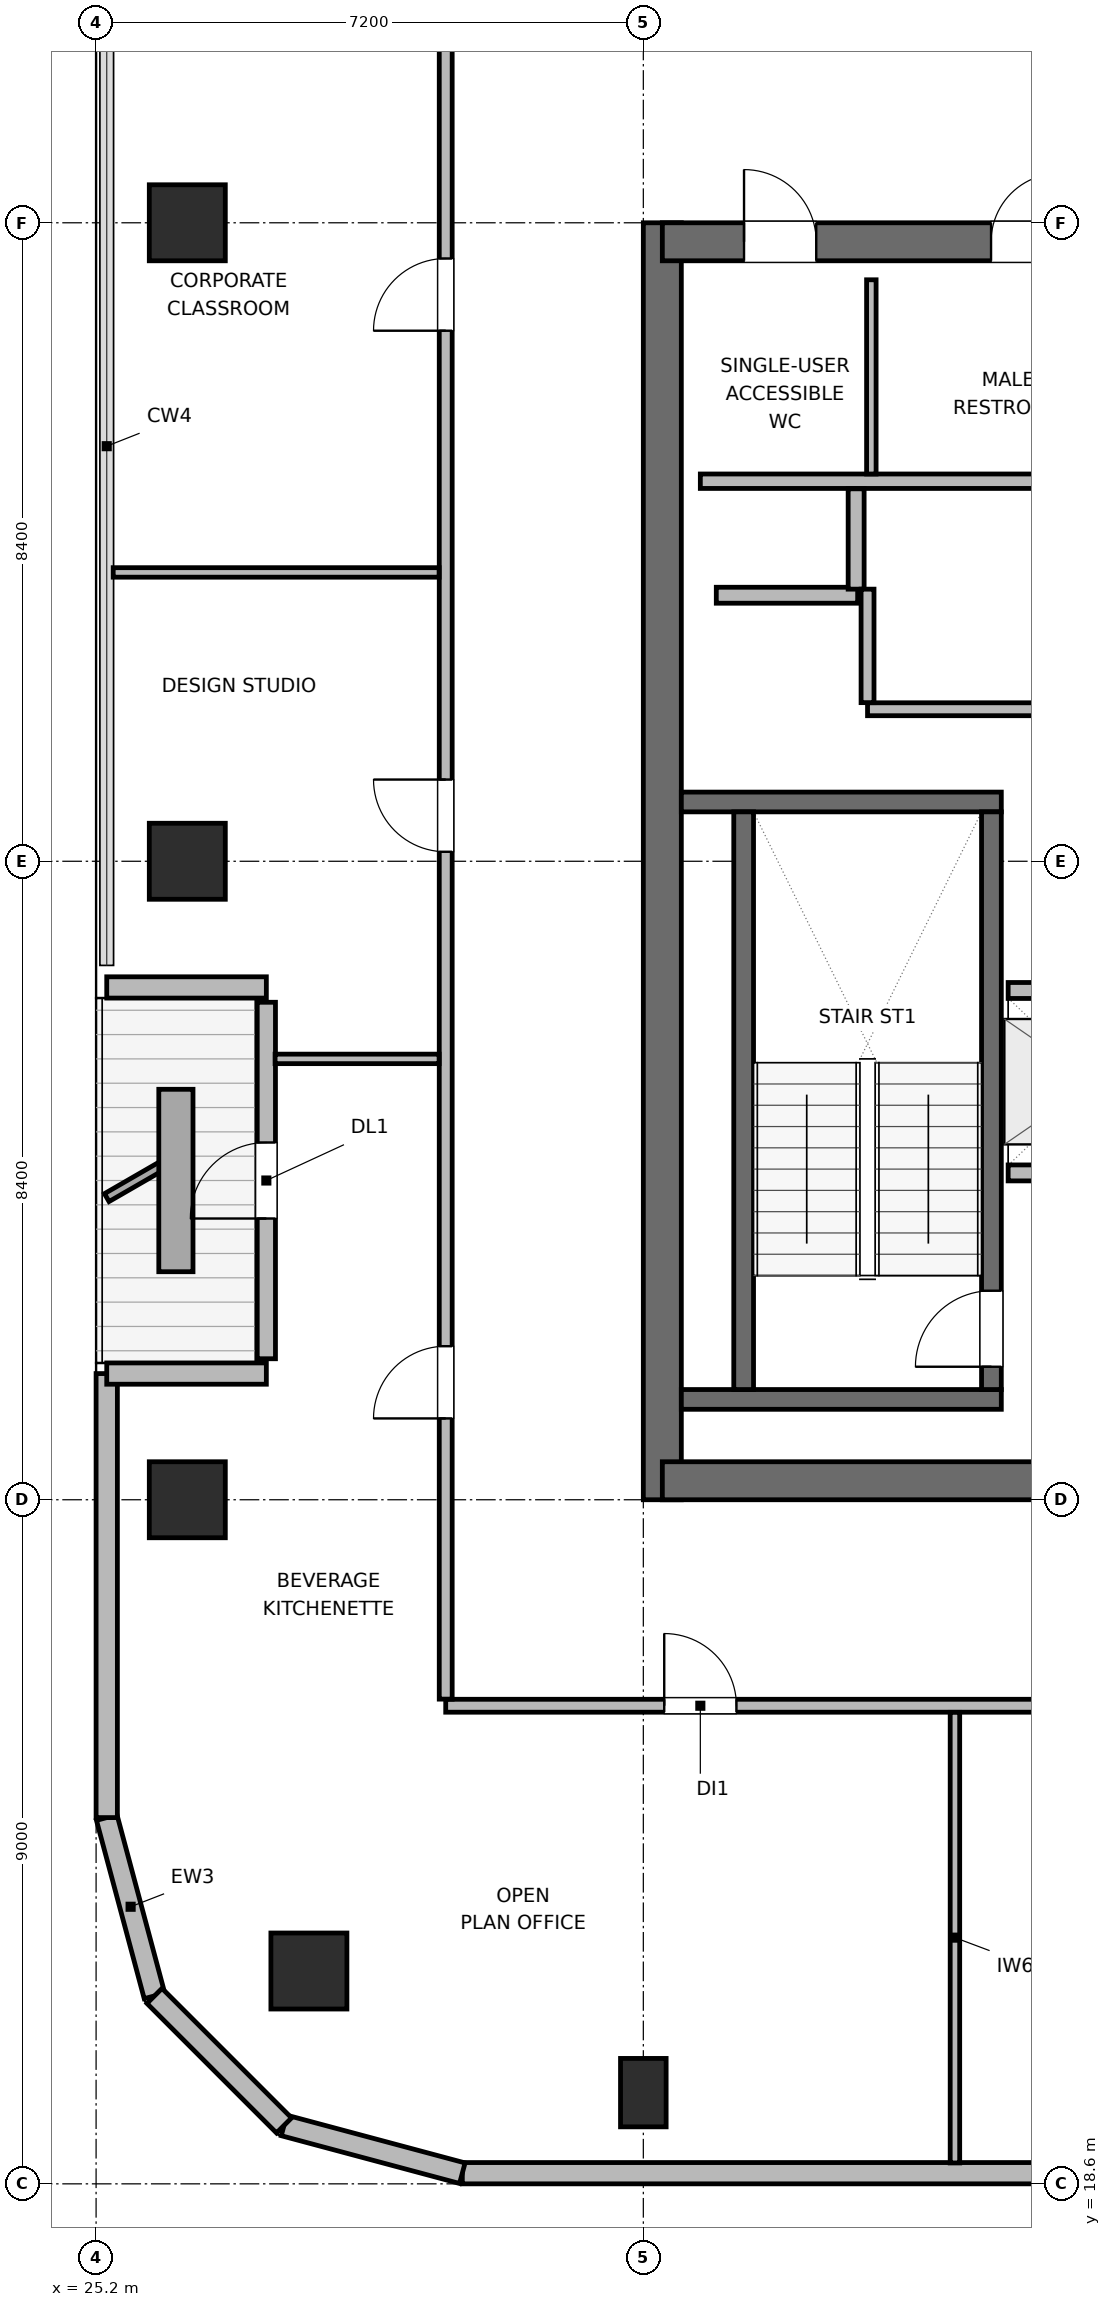
"""IFC4 building model, lengths in metres.
Left out: names, types, materials, properties, quantities, classifications, styles, units other than length and angle.
Written with IfcOpenShell. Run it as: python <this file> out.ifc"""

import sys

from ifc_helpers import new_model, si_unit, direction, frame, frame_2d, origin, origin_2d, place, context, subcontext, project, spatial, rectangle, circle, extrude, element, fill, save


model = new_model("IFC4")
c1 = context("Model", 3, precision=1e-05, world=origin(), true_north=direction((0.0, 1.0)))
c2 = subcontext(c1, "Body", "Model", "MODEL_VIEW")
j1 = project(units=[si_unit("LENGTHUNIT", "METRE"), si_unit("PLANEANGLEUNIT", "RADIAN")], contexts=[c1])
p1 = place(None, origin())
s1 = spatial("IfcSite", under=j1, at=p1, CompositionType="ELEMENT")
p2 = place(p1, origin())
s2 = spatial("IfcBuilding", under=s1, at=p2, CompositionType="ELEMENT")
p3 = place(p2, frame((0.0, 0.0, 262.8)))
s3 = spatial("IfcBuildingStorey", under=s2, at=p3, CompositionType="ELEMENT", Elevation=262.8)
p4 = place(p3, frame((32.65, 27.6, 0.0), z_axis=(0.0, 0.0, 1.0), x_axis=(0.0, 1.0, 0.0)))
e1 = element("IfcWall", 1, at=p4, inside=s3, PredefinedType="SHEAR", context=c2, shape_type="SweptSolid", body=[
    extrude(rectangle(XDim=16.8, YDim=0.5, at=frame_2d((8.4, 0.0))), origin(), (0.0, 0.0, 1.0), 3.9),
])
p5 = place(p3, frame((32.65, 27.85, 0.0), z_axis=(0.0, 0.0, 1.0), x_axis=(1.0, 0.0, 0.0)))
e2 = element("IfcWall", 2, at=p5, inside=s3, PredefinedType="SHEAR", context=c2, shape_type="SweptSolid", body=[
    extrude(rectangle(XDim=9.5, YDim=0.5, at=frame_2d((4.75, 0.0))), origin(), (0.0, 0.0, 1.0), 3.9),
])
p6 = place(p5, frame((5.075, 0.0, 0.0)))
e3 = element("IfcOpeningElement", 3, at=p6, cuts=e2, PredefinedType="OPENING", context=c2, shape_type="SweptSolid", body=[
    extrude(rectangle(XDim=1.05, YDim=2.04, at=frame_2d((0.525, 1.02))), frame((0.0, 0.26, 0.0), z_axis=(0.0, -1.0, 0.0), x_axis=(1.0, 0.0, 0.0)), (0.0, 0.0, 1.0), 0.52),
])
p7 = place(p3, frame((32.65, 44.15, 0.0), z_axis=(0.0, 0.0, 1.0), x_axis=(1.0, 0.0, 0.0)))
e4 = element("IfcWall", 4, at=p7, inside=s3, PredefinedType="SHEAR", context=c2, shape_type="SweptSolid", body=[
    extrude(rectangle(XDim=9.5, YDim=0.5, at=frame_2d((4.75, 0.0))), origin(), (0.0, 0.0, 1.0), 3.9),
])
p8 = place(p7, frame((1.075, 0.0, 0.0)))
e5 = element("IfcOpeningElement", 5, at=p8, cuts=e4, PredefinedType="OPENING", context=c2, shape_type="SweptSolid", body=[
    extrude(rectangle(XDim=0.95, YDim=2.04, at=frame_2d((0.475, 1.02))), frame((0.0, 0.26, 0.0), z_axis=(0.0, -1.0, 0.0), x_axis=(1.0, 0.0, 0.0)), (0.0, 0.0, 1.0), 0.52),
])
p9 = place(p7, frame((4.325, 0.0, 0.0)))
e6 = element("IfcOpeningElement", 6, at=p9, cuts=e4, PredefinedType="OPENING", context=c2, shape_type="SweptSolid", body=[
    extrude(rectangle(XDim=0.9, YDim=2.02, at=frame_2d((0.45, 1.01))), frame((0.0, 0.26, 0.0), z_axis=(0.0, -1.0, 0.0), x_axis=(1.0, 0.0, 0.0)), (0.0, 0.0, 1.0), 0.52),
])
p10 = place(p7, frame((7.225, 0.0, 0.0)))
e7 = element("IfcOpeningElement", 7, at=p10, cuts=e4, PredefinedType="OPENING", context=c2, shape_type="SweptSolid", body=[
    extrude(rectangle(XDim=0.9, YDim=2.02, at=frame_2d((0.45, 1.01))), frame((0.0, 0.26, 0.0), z_axis=(0.0, -1.0, 0.0), x_axis=(1.0, 0.0, 0.0)), (0.0, 0.0, 1.0), 0.52),
])
for number, where, z_axis, x_axis in (
    (8, (32.9, 28.92, 0.0), (0.0, 0.0, 1.0), (1.0, 0.0, 0.0)),
    (9, (32.9, 36.78, 0.0), (0.0, 0.0, 1.0), (1.0, 0.0, 0.0)),
):
    element("IfcWall", number, at=place(p3, frame(where, z_axis=z_axis, x_axis=x_axis)), inside=s3, PredefinedType="SHEAR", context=c2, shape_type="SweptSolid", body=[
        extrude(rectangle(XDim=4.21, YDim=0.26, at=frame_2d((2.105, 0.0))), origin(), (0.0, 0.0, 1.0), 3.9),
    ])
p11 = place(p3, frame((33.72, 29.05, 0.0), z_axis=(0.0, 0.0, 1.0), x_axis=(0.0, 1.0, 0.0)))
e10 = element("IfcWall", 10, at=p11, inside=s3, PredefinedType="SHEAR", context=c2, shape_type="SweptSolid", body=[
    extrude(rectangle(XDim=7.6, YDim=0.26, at=frame_2d((3.8, 0.0))), origin(), (0.0, 0.0, 1.0), 3.9),
])
p12 = place(p3, frame((36.98, 29.05, 0.0), z_axis=(0.0, 0.0, 1.0), x_axis=(0.0, 1.0, 0.0)))
e11 = element("IfcWall", 11, at=p12, inside=s3, PredefinedType="SHEAR", context=c2, shape_type="SweptSolid", body=[
    extrude(rectangle(XDim=7.6, YDim=0.26, at=frame_2d((3.8, 0.0))), origin(), (0.0, 0.0, 1.0), 3.9),
])
p13 = place(p12, frame((0.3, 0.0, 0.0)))
e12 = element("IfcOpeningElement", 12, at=p13, cuts=e11, PredefinedType="OPENING", context=c2, shape_type="SweptSolid", body=[
    extrude(rectangle(XDim=1.0, YDim=2.04, at=frame_2d((0.5, 1.02))), frame((0.0, 0.14, 0.0), z_axis=(0.0, -1.0, 0.0), x_axis=(1.0, 0.0, 0.0)), (0.0, 0.0, 1.0), 0.28),
])
p14 = place(p3, frame((28.0, 21.4, 0.0), z_axis=(0.0, 0.0, 1.0), x_axis=(1.0, 0.0, 0.0)))
e13 = element("IfcColumn", 13, at=p14, inside=s3, PredefinedType="COLUMN", context=c2, shape_type="SweptSolid", body=[
    extrude(circle(Radius=0.5, at=origin_2d()), origin(), (0.0, 0.0, 1.0), 3.9),
])
p15 = place(p3, frame((32.4, 19.8, 0.0), z_axis=(0.0, 0.0, 1.0), x_axis=(1.0, 0.0, 0.0)))
e14 = element("IfcColumn", 14, at=p15, inside=s3, PredefinedType="COLUMN", context=c2, shape_type="SweptSolid", body=[
    extrude(rectangle(XDim=0.6, YDim=0.9, at=origin_2d()), origin(), (0.0, 0.0, 1.0), 3.9),
])
for number, where, z_axis, x_axis in (
    (15, (26.4, 27.6, 0.0), (0.0, 0.0, 1.0), (1.0, 0.0, 0.0)),
    (16, (26.4, 36.0, 0.0), (0.0, 0.0, 1.0), (1.0, 0.0, 0.0)),
    (17, (26.4, 44.4, 0.0), (0.0, 0.0, 1.0), (1.0, 0.0, 0.0)),
):
    element("IfcColumn", number, at=place(p3, frame(where, z_axis=z_axis, x_axis=x_axis)), inside=s3, PredefinedType="COLUMN", context=c2, shape_type="SweptSolid", body=[
        extrude(rectangle(XDim=1.0, YDim=1.0, at=origin_2d()), origin(), (0.0, 0.0, 1.0), 3.9),
    ])
p16 = place(p3, frame((25.969, 21.073, 0.0), z_axis=(0.0, 0.0, 1.0), x_axis=(-0.258751159445, 0.965944013639, 0.0)))
e18 = element("IfcWall", 18, at=p16, inside=s3, PredefinedType="SOLIDWALL", context=c2, shape_type="SweptSolid", body=[
    extrude(rectangle(XDim=2.429, YDim=0.28, at=frame_2d((1.214, 0.0))), origin(), (0.0, 0.0, 1.0), 3.68),
])
p17 = place(p3, frame((25.34, 23.418, 0.0), z_axis=(0.0, 0.0, 1.0), x_axis=(0.0, 1.0, 0.0)))
e19 = element("IfcWall", 19, at=p17, inside=s3, PredefinedType="SOLIDWALL", context=c2, shape_type="SweptSolid", body=[
    extrude(rectangle(XDim=5.842, YDim=0.28, at=frame_2d((2.921, 0.0))), origin(), (0.0, 0.0, 1.0), 3.68),
])
p18 = place(p3, frame((25.34, 29.26, 0.0), z_axis=(0.0, 0.0, 1.0), x_axis=(1.0, 0.0, 0.0)))
e20 = element("IfcWall", 20, at=p18, inside=s3, PredefinedType="SOLIDWALL", context=c2, shape_type="SweptSolid", body=[
    extrude(rectangle(XDim=2.1, YDim=0.28, at=frame_2d((1.05, 0.0))), origin(), (0.0, 0.0, 1.0), 3.126),
])
p19 = place(p3, frame((27.44, 29.455, 0.0), z_axis=(0.0, 0.0, 1.0), x_axis=(0.0, 1.0, 0.0)))
e21 = element("IfcWall", 21, at=p19, inside=s3, PredefinedType="SOLIDWALL", context=c2, shape_type="SweptSolid", body=[
    extrude(rectangle(XDim=4.69, YDim=0.24, at=frame_2d((2.345, 0.0))), origin(), (0.0, 0.0, 1.0), 3.311),
])
p20 = place(p19, frame((1.845, 0.0, 0.0)))
e22 = element("IfcOpeningElement", 22, at=p20, cuts=e21, PredefinedType="OPENING", context=c2, shape_type="SweptSolid", body=[
    extrude(rectangle(XDim=1.0, YDim=2.02, at=frame_2d((0.5, 1.01))), frame((0.0, 0.13, 0.0), z_axis=(0.0, -1.0, 0.0), x_axis=(1.0, 0.0, 0.0)), (0.0, 0.0, 1.0), 0.26),
])
p21 = place(p3, frame((27.44, 34.34, 0.0), z_axis=(0.0, 0.0, 1.0), x_axis=(-1.0, 0.0, 0.0)))
e23 = element("IfcWall", 23, at=p21, inside=s3, PredefinedType="SOLIDWALL", context=c2, shape_type="SweptSolid", body=[
    extrude(rectangle(XDim=2.1, YDim=0.28, at=frame_2d((1.05, 0.0))), origin(), (0.0, 0.0, 1.0), 3.126),
])
p22 = place(p3, frame((41.369, 18.74, 0.0), z_axis=(0.0, 0.0, 1.0), x_axis=(-1.0, 0.0, 0.0)))
e24 = element("IfcWall", 24, at=p22, inside=s3, PredefinedType="SOLIDWALL", context=c2, shape_type="SweptSolid", body=[
    extrude(rectangle(XDim=11.351, YDim=0.28, at=frame_2d((5.675, 0.0))), origin(), (0.0, 0.0, 1.0), 3.68),
])
p23 = place(p3, frame((30.018, 18.74, 0.0), z_axis=(0.0, 0.0, 1.0), x_axis=(-0.965937282298, 0.25877628691, 0.0)))
e25 = element("IfcWall", 25, at=p23, inside=s3, PredefinedType="SOLIDWALL", context=c2, shape_type="SweptSolid", body=[
    extrude(rectangle(XDim=2.428, YDim=0.28, at=frame_2d((1.214, 0.0))), origin(), (0.0, 0.0, 1.0), 3.68),
])
p24 = place(p3, frame((27.673, 19.368, 0.0), z_axis=(0.0, 0.0, 1.0), x_axis=(-0.707106781187, 0.707106781187, 0.0)))
e26 = element("IfcWall", 26, at=p24, inside=s3, PredefinedType="SOLIDWALL", context=c2, shape_type="SweptSolid", body=[
    extrude(rectangle(XDim=2.41, YDim=0.28, at=frame_2d((1.205, 0.0))), origin(), (0.0, 0.0, 1.0), 3.68),
])
p25 = place(p3, frame((33.15, 41.0, 0.0), z_axis=(0.0, 0.0, 1.0), x_axis=(1.0, 0.0, 0.0)))
e27 = element("IfcWall", 27, at=p25, inside=s3, PredefinedType="PLUMBINGWALL", context=c2, shape_type="SweptSolid", body=[
    extrude(rectangle(XDim=8.5, YDim=0.19, at=frame_2d((4.25, 0.0))), origin(), (0.0, 0.0, 1.0), 3.68),
])
p26 = place(p3, frame((35.4, 41.095, 0.0), z_axis=(0.0, 0.0, 1.0), x_axis=(0.0, 1.0, 0.0)))
e28 = element("IfcWall", 28, at=p26, inside=s3, PredefinedType="PARTITIONING", context=c2, shape_type="SweptSolid", body=[
    extrude(rectangle(XDim=2.555, YDim=0.125, at=frame_2d((1.277, 0.0))), origin(), (0.0, 0.0, 1.0), 3.68),
])
p27 = place(p3, frame((33.36, 39.5, 0.0), z_axis=(0.0, 0.0, 1.0), x_axis=(1.0, 0.0, 0.0)))
e29 = element("IfcWall", 29, at=p27, inside=s3, PredefinedType="PARTITIONING", context=c2, shape_type="SweptSolid", body=[
    extrude(rectangle(XDim=1.86, YDim=0.21, at=frame_2d((0.93, 0.0))), origin(), (0.0, 0.0, 1.0), 3.68),
])
p28 = place(p3, frame((35.2, 39.58, 0.0), z_axis=(0.0, 0.0, 1.0), x_axis=(0.0, 1.0, 0.0)))
e30 = element("IfcWall", 30, at=p28, inside=s3, PredefinedType="PARTITIONING", context=c2, shape_type="SweptSolid", body=[
    extrude(rectangle(XDim=1.32, YDim=0.21, at=frame_2d((0.66, 0.0))), origin(), (0.0, 0.0, 1.0), 3.68),
])
p29 = place(p3, frame((37.2, 31.9, 0.0), z_axis=(0.0, 0.0, 1.0), x_axis=(1.0, 0.0, 0.0)))
e31 = element("IfcWall", 31, at=p29, inside=s3, PredefinedType="PARTITIONING", context=c2, shape_type="SweptSolid", body=[
    extrude(rectangle(XDim=2.3, YDim=0.21, at=frame_2d((1.15, 0.0))), origin(), (0.0, 0.0, 1.0), 3.68),
])
p30 = place(p29, frame((0.55, 0.0, 0.0)))
e32 = element("IfcOpeningElement", 32, at=p30, cuts=e31, PredefinedType="OPENING", context=c2, shape_type="SweptSolid", body=[
    extrude(rectangle(XDim=1.2, YDim=2.04, at=frame_2d((0.6, 1.02))), frame((0.0, 0.115, 0.0), z_axis=(0.0, -1.0, 0.0), x_axis=(1.0, 0.0, 0.0)), (0.0, 0.0, 1.0), 0.23),
])
p31 = place(p3, frame((37.2, 34.3, 0.0), z_axis=(0.0, 0.0, 1.0), x_axis=(1.0, 0.0, 0.0)))
e33 = element("IfcWall", 33, at=p31, inside=s3, PredefinedType="PARTITIONING", context=c2, shape_type="SweptSolid", body=[
    extrude(rectangle(XDim=2.3, YDim=0.21, at=frame_2d((1.15, 0.0))), origin(), (0.0, 0.0, 1.0), 3.68),
])
p32 = place(p3, frame((35.35, 38.0, 0.0), z_axis=(0.0, 0.0, 1.0), x_axis=(1.0, 0.0, 0.0)))
e34 = element("IfcWall", 34, at=p32, inside=s3, PredefinedType="PARTITIONING", context=c2, shape_type="SweptSolid", body=[
    extrude(rectangle(XDim=6.1, YDim=0.17, at=frame_2d((3.05, 0.0))), origin(), (0.0, 0.0, 1.0), 3.68),
])
p33 = place(p32, frame((2.6, 0.0, 0.0)))
e35 = element("IfcOpeningElement", 35, at=p33, cuts=e34, PredefinedType="OPENING", context=c2, shape_type="SweptSolid", body=[
    extrude(rectangle(XDim=0.9, YDim=2.02, at=frame_2d((0.45, 1.01))), frame((0.0, 0.095, 0.0), z_axis=(0.0, -1.0, 0.0), x_axis=(1.0, 0.0, 0.0)), (0.0, 0.0, 1.0), 0.19),
])
p34 = place(p3, frame((35.35, 38.087, 0.0), z_axis=(0.0, 0.0, 1.0), x_axis=(0.0, 1.0, 0.0)))
e36 = element("IfcWall", 36, at=p34, inside=s3, PredefinedType="PARTITIONING", context=c2, shape_type="SweptSolid", body=[
    extrude(rectangle(XDim=1.493, YDim=0.17, at=frame_2d((0.747, 0.0))), origin(), (0.0, 0.0, 1.0), 3.68),
])
p35 = place(p3, frame((29.8, 24.89, 0.0), z_axis=(0.0, 0.0, 1.0), x_axis=(1.0, 0.0, 0.0)))
e37 = element("IfcWall", 37, at=p35, inside=s3, PredefinedType="PARTITIONING", context=c2, shape_type="SweptSolid", body=[
    extrude(rectangle(XDim=33.8, YDim=0.17, at=frame_2d((16.9, 0.0))), origin(), (0.0, 0.0, 1.0), 3.68),
])
p36 = place(p35, frame((2.875, 0.0, 0.0)))
e38 = element("IfcOpeningElement", 38, at=p36, cuts=e37, PredefinedType="OPENING", context=c2, shape_type="SweptSolid", body=[
    extrude(rectangle(XDim=0.95, YDim=2.04, at=frame_2d((0.475, 1.02))), frame((0.0, 0.095, 0.0), z_axis=(0.0, -1.0, 0.0), x_axis=(1.0, 0.0, 0.0)), (0.0, 0.0, 1.0), 0.19),
])
p37 = place(p35, frame((14.225, 0.0, 0.0)))
e39 = element("IfcOpeningElement", 39, at=p37, cuts=e37, PredefinedType="OPENING", context=c2, shape_type="SweptSolid", body=[
    extrude(rectangle(XDim=0.95, YDim=2.04, at=frame_2d((0.475, 1.02))), frame((0.0, 0.095, 0.0), z_axis=(0.0, -1.0, 0.0), x_axis=(1.0, 0.0, 0.0)), (0.0, 0.0, 1.0), 0.19),
])
p38 = place(p35, frame((27.775, 0.0, 0.0)))
e40 = element("IfcOpeningElement", 40, at=p38, cuts=e37, PredefinedType="OPENING", context=c2, shape_type="SweptSolid", body=[
    extrude(rectangle(XDim=0.95, YDim=2.04, at=frame_2d((0.475, 1.02))), frame((0.0, 0.095, 0.0), z_axis=(0.0, -1.0, 0.0), x_axis=(1.0, 0.0, 0.0)), (0.0, 0.0, 1.0), 0.19),
])
p39 = place(p3, frame((29.8, 24.977, 0.0), z_axis=(0.0, 0.0, 1.0), x_axis=(0.0, 1.0, 0.0)))
e41 = element("IfcWall", 41, at=p39, inside=s3, PredefinedType="PARTITIONING", context=c2, shape_type="SweptSolid", body=[
    extrude(rectangle(XDim=22.046, YDim=0.17, at=frame_2d((11.023, 0.0))), origin(), (0.0, 0.0, 1.0), 3.68),
])
p40 = place(p39, frame((3.693, 0.0, 0.0)))
e42 = element("IfcOpeningElement", 42, at=p40, cuts=e41, PredefinedType="OPENING", context=c2, shape_type="SweptSolid", body=[
    extrude(rectangle(XDim=0.95, YDim=2.04, at=frame_2d((0.475, 1.02))), frame((0.0, 0.095, 0.0), z_axis=(0.0, -1.0, 0.0), x_axis=(1.0, 0.0, 0.0)), (0.0, 0.0, 1.0), 0.19),
])
p41 = place(p39, frame((11.148, 0.0, 0.0)))
e43 = element("IfcOpeningElement", 43, at=p41, cuts=e41, PredefinedType="OPENING", context=c2, shape_type="SweptSolid", body=[
    extrude(rectangle(XDim=0.95, YDim=2.04, at=frame_2d((0.475, 1.02))), frame((0.0, 0.095, 0.0), z_axis=(0.0, -1.0, 0.0), x_axis=(1.0, 0.0, 0.0)), (0.0, 0.0, 1.0), 0.19),
])
p42 = place(p39, frame((18.003, 0.0, 0.0)))
e44 = element("IfcOpeningElement", 44, at=p42, cuts=e41, PredefinedType="OPENING", context=c2, shape_type="SweptSolid", body=[
    extrude(rectangle(XDim=0.95, YDim=2.04, at=frame_2d((0.475, 1.02))), frame((0.0, 0.095, 0.0), z_axis=(0.0, -1.0, 0.0), x_axis=(1.0, 0.0, 0.0)), (0.0, 0.0, 1.0), 0.19),
])
p43 = place(p3, frame((36.5, 18.875, 0.0), z_axis=(0.0, 0.0, 1.0), x_axis=(0.0, 1.0, 0.0)))
e45 = element("IfcWall", 45, at=p43, inside=s3, PredefinedType="PARTITIONING", context=c2, shape_type="SweptSolid", body=[
    extrude(rectangle(XDim=5.928, YDim=0.125, at=frame_2d((2.964, 0.0))), origin(), (0.0, 0.0, 1.0), 3.68),
])
p44 = place(p3, frame((27.555, 33.4, 0.0), z_axis=(0.0, 0.0, 1.0), x_axis=(1.0, 0.0, 0.0)))
e46 = element("IfcWall", 46, at=p44, inside=s3, PredefinedType="PARTITIONING", context=c2, shape_type="SweptSolid", body=[
    extrude(rectangle(XDim=2.158, YDim=0.125, at=frame_2d((1.079, 0.0))), origin(), (0.0, 0.0, 1.0), 3.68),
])
p45 = place(p3, frame((25.425, 39.8, 0.0), z_axis=(0.0, 0.0, 1.0), x_axis=(1.0, 0.0, 0.0)))
e47 = element("IfcWall", 47, at=p45, inside=s3, PredefinedType="PARTITIONING", context=c2, shape_type="SweptSolid", body=[
    extrude(rectangle(XDim=4.288, YDim=0.125, at=frame_2d((2.144, 0.0))), origin(), (0.0, 0.0, 1.0), 3.68),
])
p46 = place(p20, origin())
e48 = element("IfcDoor", 48, at=p46, inside=s3, OperationType="SINGLE_SWING_LEFT", PredefinedType="DOOR", context=c2, shape_type="SweptSolid", body=[
    extrude(rectangle(XDim=1.0, YDim=2.02, at=frame_2d((0.5, 1.01))), frame((0.0, 0.025, 0.0), z_axis=(0.0, -1.0, 0.0), x_axis=(1.0, 0.0, 0.0)), (0.0, 0.0, 1.0), 0.05),
])
fill(e22, e48)
p47 = place(p13, origin())
e49 = element("IfcDoor", 49, at=p47, inside=s3, OperationType="SINGLE_SWING_LEFT", PredefinedType="DOOR", context=c2, shape_type="SweptSolid", body=[
    extrude(rectangle(XDim=1.0, YDim=2.04, at=frame_2d((0.5, 1.02))), frame((0.0, 0.025, 0.0), z_axis=(0.0, -1.0, 0.0), x_axis=(1.0, 0.0, 0.0)), (0.0, 0.0, 1.0), 0.05),
])
fill(e12, e49)
p48 = place(p8, origin())
e50 = element("IfcDoor", 50, at=p48, inside=s3, OperationType="SINGLE_SWING_LEFT", PredefinedType="DOOR", context=c2, shape_type="SweptSolid", body=[
    extrude(rectangle(XDim=0.95, YDim=2.04, at=frame_2d((0.475, 1.02))), frame((0.0, 0.025, 0.0), z_axis=(0.0, -1.0, 0.0), x_axis=(1.0, 0.0, 0.0)), (0.0, 0.0, 1.0), 0.05),
])
fill(e5, e50)
p49 = place(p9, origin())
e51 = element("IfcDoor", 51, at=p49, inside=s3, OperationType="SINGLE_SWING_RIGHT", PredefinedType="DOOR", context=c2, shape_type="SweptSolid", body=[
    extrude(rectangle(XDim=0.9, YDim=2.02, at=frame_2d((0.45, 1.01))), frame((0.0, 0.025, 0.0), z_axis=(0.0, -1.0, 0.0), x_axis=(1.0, 0.0, 0.0)), (0.0, 0.0, 1.0), 0.05),
])
fill(e6, e51)
p50 = place(p36, origin())
e52 = element("IfcDoor", 52, at=p50, inside=s3, OperationType="SINGLE_SWING_LEFT", PredefinedType="DOOR", context=c2, shape_type="SweptSolid", body=[
    extrude(rectangle(XDim=0.95, YDim=2.04, at=frame_2d((0.475, 1.02))), frame((0.0, 0.025, 0.0), z_axis=(0.0, -1.0, 0.0), x_axis=(1.0, 0.0, 0.0)), (0.0, 0.0, 1.0), 0.05),
])
fill(e38, e52)
p51 = place(p40, origin())
e53 = element("IfcDoor", 53, at=p51, inside=s3, OperationType="SINGLE_SWING_LEFT", PredefinedType="DOOR", context=c2, shape_type="SweptSolid", body=[
    extrude(rectangle(XDim=0.95, YDim=2.04, at=frame_2d((0.475, 1.02))), frame((0.0, 0.025, 0.0), z_axis=(0.0, -1.0, 0.0), x_axis=(1.0, 0.0, 0.0)), (0.0, 0.0, 1.0), 0.05),
])
fill(e42, e53)
p52 = place(p41, origin())
e54 = element("IfcDoor", 54, at=p52, inside=s3, OperationType="SINGLE_SWING_RIGHT", PredefinedType="DOOR", context=c2, shape_type="SweptSolid", body=[
    extrude(rectangle(XDim=0.95, YDim=2.04, at=frame_2d((0.475, 1.02))), frame((0.0, 0.025, 0.0), z_axis=(0.0, -1.0, 0.0), x_axis=(1.0, 0.0, 0.0)), (0.0, 0.0, 1.0), 0.05),
])
fill(e43, e54)
p53 = place(p42, origin())
e55 = element("IfcDoor", 55, at=p53, inside=s3, OperationType="SINGLE_SWING_LEFT", PredefinedType="DOOR", context=c2, shape_type="SweptSolid", body=[
    extrude(rectangle(XDim=0.95, YDim=2.04, at=frame_2d((0.475, 1.02))), frame((0.0, 0.025, 0.0), z_axis=(0.0, -1.0, 0.0), x_axis=(1.0, 0.0, 0.0)), (0.0, 0.0, 1.0), 0.05),
])
fill(e44, e55)
save(model, sys.argv[1])
